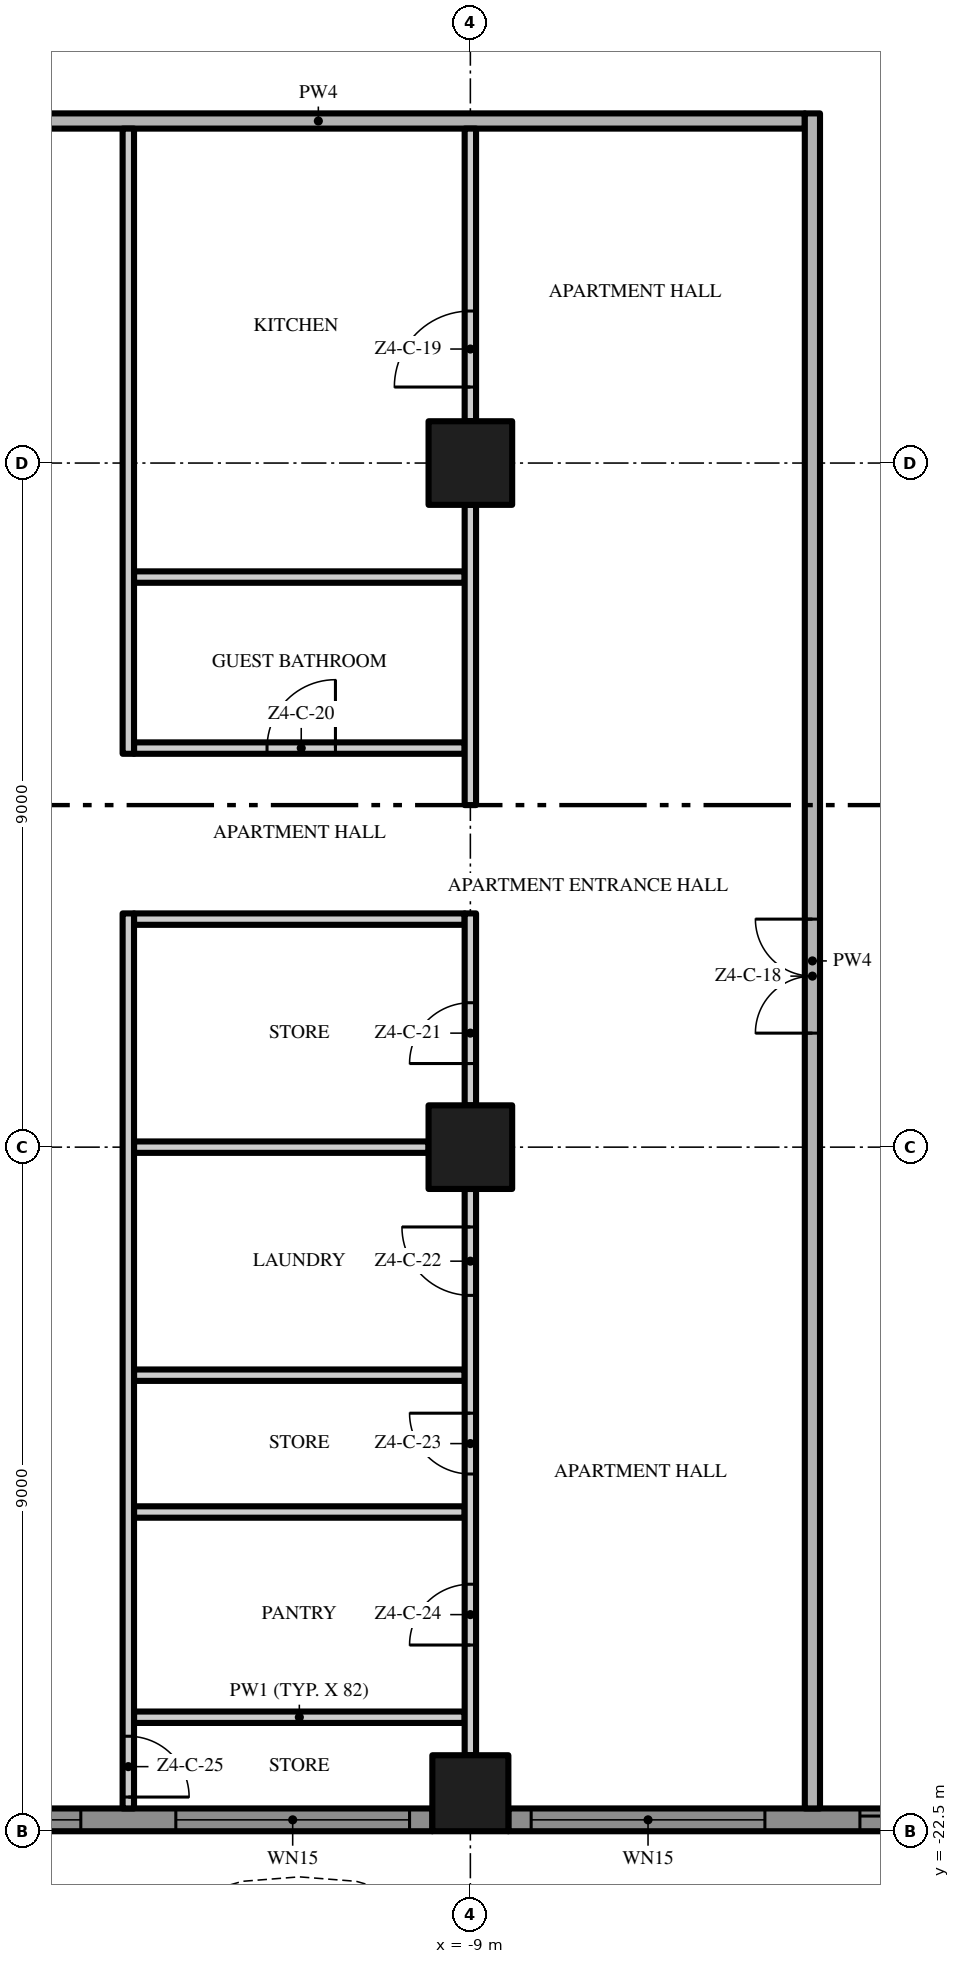
"""IFC4 building model, lengths in metres.
Left out: names, types, materials, properties, quantities, classifications, styles, units other than length and angle.
Written with IfcOpenShell. Run it as: python <this file> out.ifc"""

import sys

from ifc_helpers import new_model, si_unit, direction, frame, frame_2d, origin, origin_2d, place, context, subcontext, project, spatial, polyline, rectangle, outline, extrude, element, fill, save


model = new_model("IFC4")
c1 = context("Model", 3, precision=1e-05, world=origin(), true_north=direction((0.0, 1.0)))
c2 = subcontext(c1, "Body", "Model", "MODEL_VIEW")
j1 = project(units=[si_unit("LENGTHUNIT", "METRE"), si_unit("PLANEANGLEUNIT", "RADIAN")], contexts=[c1])
p1 = place(None, origin())
s1 = spatial("IfcSite", under=j1, at=p1, CompositionType="ELEMENT")
p2 = place(p1, origin())
s2 = spatial("IfcBuilding", under=s1, at=p2, CompositionType="ELEMENT")
p3 = place(p2, frame((0.0, 0.0, 211.0)))
s3 = spatial("IfcBuildingStorey", under=s2, at=p3, CompositionType="ELEMENT", Elevation=211.0)
p4 = place(p3, frame((-9.0, -13.5, 0.0), z_axis=(0.0, 0.0, 1.0), x_axis=(1.0, 0.0, 0.0)))
e1 = element("IfcColumn", 1, at=p4, inside=s3, PredefinedType="COLUMN", context=c2, shape_type="SweptSolid", body=[
    extrude(rectangle(XDim=1.1, YDim=1.1, at=origin_2d()), origin(), (0.0, 0.0, 1.0), 3.5),
])
p5 = place(p3, frame((-9.0, -22.0, 0.0), z_axis=(0.0, 0.0, 1.0), x_axis=(1.0, 0.0, 0.0)))
e2 = element("IfcColumn", 2, at=p5, inside=s3, PredefinedType="COLUMN", context=c2, shape_type="SweptSolid", body=[
    extrude(rectangle(XDim=1.0, YDim=1.0, at=origin_2d()), origin(), (0.0, 0.0, 1.0), 3.5),
])
p6 = place(p3, frame((-9.0, -4.5, 0.0), z_axis=(0.0, 0.0, 1.0), x_axis=(1.0, 0.0, 0.0)))
e3 = element("IfcColumn", 3, at=p6, inside=s3, PredefinedType="COLUMN", context=c2, shape_type="SweptSolid", body=[
    extrude(rectangle(XDim=1.1, YDim=1.1, at=origin_2d()), origin(), (0.0, 0.0, 1.0), 3.5),
])
p7 = place(p3, frame((-9.5, -22.35, 0.0), z_axis=(0.0, 0.0, 1.0), x_axis=(-1.0, 0.0, 0.0)))
e4 = element("IfcWall", 4, at=p7, inside=s3, PredefinedType="SOLIDWALL", context=c2, shape_type="SweptSolid", body=[
    extrude(rectangle(XDim=8.0, YDim=0.3, at=frame_2d((4.0, 0.0))), origin(), (0.0, 0.0, 1.0), 3.5),
])
p8 = place(p7, frame((4.625, 0.0, 0.45)))
e5 = element("IfcOpeningElement", 5, at=p8, cuts=e4, PredefinedType="OPENING", context=c2, shape_type="SweptSolid", body=[
    extrude(rectangle(XDim=3.075, YDim=2.65, at=frame_2d((1.538, 1.325))), frame((0.0, 0.16, 0.0), z_axis=(0.0, -1.0, 0.0), x_axis=(1.0, 0.0, 0.0)), (0.0, 0.0, 1.0), 0.32),
])
p9 = place(p7, frame((0.3, 0.0, 0.45)))
e6 = element("IfcOpeningElement", 6, at=p9, cuts=e4, PredefinedType="OPENING", context=c2, shape_type="SweptSolid", body=[
    extrude(rectangle(XDim=3.075, YDim=2.65, at=frame_2d((1.538, 1.325))), frame((0.0, 0.16, 0.0), z_axis=(0.0, -1.0, 0.0), x_axis=(1.0, 0.0, 0.0)), (0.0, 0.0, 1.0), 0.32),
])
p10 = place(p3, frame((-0.5, -22.35, 0.0), z_axis=(0.0, 0.0, 1.0), x_axis=(-1.0, 0.0, 0.0)))
e7 = element("IfcWall", 7, at=p10, inside=s3, PredefinedType="SOLIDWALL", context=c2, shape_type="SweptSolid", body=[
    extrude(rectangle(XDim=8.0, YDim=0.3, at=frame_2d((4.0, 0.0))), origin(), (0.0, 0.0, 1.0), 3.5),
])
p11 = place(p10, frame((4.625, 0.0, 0.45)))
e8 = element("IfcOpeningElement", 8, at=p11, cuts=e7, PredefinedType="OPENING", context=c2, shape_type="SweptSolid", body=[
    extrude(rectangle(XDim=3.075, YDim=2.65, at=frame_2d((1.538, 1.325))), frame((0.0, 0.16, 0.0), z_axis=(0.0, -1.0, 0.0), x_axis=(1.0, 0.0, 0.0)), (0.0, 0.0, 1.0), 0.32),
])
p12 = place(p10, frame((0.3, 0.0, 0.0)))
e9 = element("IfcOpeningElement", 9, at=p12, cuts=e7, PredefinedType="OPENING", context=c2, shape_type="SweptSolid", body=[
    extrude(rectangle(XDim=3.075, YDim=2.4, at=frame_2d((1.538, 1.2))), frame((0.0, 0.16, 0.0), z_axis=(0.0, -1.0, 0.0), x_axis=(1.0, 0.0, 0.0)), (0.0, 0.0, 1.0), 0.32),
])
p13 = place(p3, origin())
e10 = element("IfcWall", 10, at=p13, inside=s3, PredefinedType="USERDEFINED", context=c2, shape_type="SweptSolid", body=[
    extrude(outline(polyline([(-22.5, -24.3), (-21.0, -25.005), (-19.5, -25.441), (-18.75, -25.5), (-18.0, -25.441), (-16.5, -25.005), (-15.0, -24.3), (-13.5, -23.595), (-12.0, -23.159), (-11.25, -23.1), (-10.5, -23.159), (-9.0, -23.595), (-7.5, -24.3), (-6.0, -25.005), (-4.5, -25.441), (-3.75, -25.5), (-3.0, -25.441), (-1.5, -25.005), (0.0, -24.3), (1.5, -23.595), (3.0, -23.159), (3.75, -23.1), (4.5, -23.159), (6.0, -23.595), (7.5, -24.3), (9.0, -25.005), (10.5, -25.441), (11.25, -25.5), (12.0, -25.441), (13.5, -25.005), (15.0, -24.3), (16.5, -23.595), (18.0, -23.159), (18.75, -23.1), (19.5, -23.159), (21.0, -23.595), (22.5, -24.3), (22.606, -24.074), (21.089, -23.36), (19.545, -22.911), (18.75, -22.849), (17.955, -22.911), (16.411, -23.36), (14.894, -24.074), (13.411, -24.771), (11.955, -25.194), (11.25, -25.249), (10.545, -25.194), (9.089, -24.771), (7.606, -24.074), (6.089, -23.36), (4.545, -22.911), (3.75, -22.849), (2.955, -22.911), (1.411, -23.36), (-0.106, -24.074), (-1.589, -24.771), (-3.045, -25.194), (-3.75, -25.249), (-4.455, -25.194), (-5.911, -24.771), (-7.394, -24.074), (-8.911, -23.36), (-10.455, -22.911), (-11.25, -22.849), (-12.045, -22.911), (-13.589, -23.36), (-15.106, -24.074), (-16.589, -24.771), (-18.045, -25.194), (-18.75, -25.249), (-19.455, -25.194), (-20.911, -24.771), (-22.394, -24.074), (-22.5, -24.3)])), origin(), (0.0, 0.0, 1.0), 0.9),
])
for number, where, z_axis, x_axis in (
    (11, (-13.425, -21.0, 0.0), (0.0, 0.0, 1.0), (1.0, 0.0, 0.0)),
    (12, (-13.425, -18.3, 0.0), (0.0, 0.0, 1.0), (1.0, 0.0, 0.0)),
    (13, (-13.425, -16.5, 0.0), (0.0, 0.0, 1.0), (1.0, 0.0, 0.0)),
):
    element("IfcWall", number, at=place(p3, frame(where, z_axis=z_axis, x_axis=x_axis)), inside=s3, PredefinedType="PARTITIONING", context=c2, shape_type="SweptSolid", body=[
        extrude(rectangle(XDim=4.35, YDim=0.15, at=frame_2d((2.175, 0.0))), origin(), (0.0, 0.0, 1.0), 3.5),
    ])
p14 = place(p3, frame((-13.425, -13.5, 0.0), z_axis=(0.0, 0.0, 1.0), x_axis=(1.0, 0.0, 0.0)))
e14 = element("IfcWall", 14, at=p14, inside=s3, PredefinedType="PARTITIONING", context=c2, shape_type="SweptSolid", body=[
    extrude(rectangle(XDim=3.875, YDim=0.15, at=frame_2d((1.938, 0.0))), origin(), (0.0, 0.0, 1.0), 3.5),
])
p15 = place(p3, frame((-13.425, -10.5, 0.0), z_axis=(0.0, 0.0, 1.0), x_axis=(1.0, 0.0, 0.0)))
e15 = element("IfcWall", 15, at=p15, inside=s3, PredefinedType="PARTITIONING", context=c2, shape_type="SweptSolid", body=[
    extrude(rectangle(XDim=4.35, YDim=0.15, at=frame_2d((2.175, 0.0))), origin(), (0.0, 0.0, 1.0), 3.5),
])
p16 = place(p3, frame((-13.425, -8.25, 0.0), z_axis=(0.0, 0.0, 1.0), x_axis=(1.0, 0.0, 0.0)))
e16 = element("IfcWall", 16, at=p16, inside=s3, PredefinedType="PARTITIONING", context=c2, shape_type="SweptSolid", body=[
    extrude(rectangle(XDim=4.35, YDim=0.15, at=frame_2d((2.175, 0.0))), origin(), (0.0, 0.0, 1.0), 3.5),
])
p17 = place(p16, frame((1.75, 0.0, 0.0)))
e17 = element("IfcOpeningElement", 17, at=p17, cuts=e16, PredefinedType="OPENING", context=c2, shape_type="SweptSolid", body=[
    extrude(rectangle(XDim=0.9, YDim=2.1, at=frame_2d((0.45, 1.05))), frame((0.0, 0.085, 0.0), z_axis=(0.0, -1.0, 0.0), x_axis=(1.0, 0.0, 0.0)), (0.0, 0.0, 1.0), 0.17),
])
p18 = place(p3, frame((-13.425, -6.0, 0.0), z_axis=(0.0, 0.0, 1.0), x_axis=(1.0, 0.0, 0.0)))
e18 = element("IfcWall", 18, at=p18, inside=s3, PredefinedType="PARTITIONING", context=c2, shape_type="SweptSolid", body=[
    extrude(rectangle(XDim=4.35, YDim=0.15, at=frame_2d((2.175, 0.0))), origin(), (0.0, 0.0, 1.0), 3.5),
])
p19 = place(p3, frame((-17.4, 0.0, 0.0), z_axis=(0.0, 0.0, 1.0), x_axis=(1.0, 0.0, 0.0)))
e19 = element("IfcWall", 19, at=p19, inside=s3, PredefinedType="PARTITIONING", context=c2, shape_type="SweptSolid", body=[
    extrude(rectangle(XDim=12.8, YDim=0.2, at=frame_2d((6.4, 0.0))), origin(), (0.0, 0.0, 1.0), 3.5),
])
p20 = place(p3, frame((-13.5, -10.425, 0.0), z_axis=(0.0, 0.0, 1.0), x_axis=(0.0, -1.0, 0.0)))
e20 = element("IfcWall", 20, at=p20, inside=s3, PredefinedType="PARTITIONING", context=c2, shape_type="SweptSolid", body=[
    extrude(rectangle(XDim=11.775, YDim=0.15, at=frame_2d((5.888, 0.0))), origin(), (0.0, 0.0, 1.0), 3.5),
])
p21 = place(p20, frame((10.825, 0.0, 0.0)))
e21 = element("IfcOpeningElement", 21, at=p21, cuts=e20, PredefinedType="OPENING", context=c2, shape_type="SweptSolid", body=[
    extrude(rectangle(XDim=0.8, YDim=2.0, at=frame_2d((0.4, 1.0))), frame((0.0, 0.085, 0.0), z_axis=(0.0, -1.0, 0.0), x_axis=(1.0, 0.0, 0.0)), (0.0, 0.0, 1.0), 0.17),
])
p22 = place(p3, frame((-13.5, -8.325, 0.0), z_axis=(0.0, 0.0, 1.0), x_axis=(0.0, 1.0, 0.0)))
e22 = element("IfcWall", 22, at=p22, inside=s3, PredefinedType="PARTITIONING", context=c2, shape_type="SweptSolid", body=[
    extrude(rectangle(XDim=8.225, YDim=0.15, at=frame_2d((4.112, 0.0))), origin(), (0.0, 0.0, 1.0), 3.5),
])
p23 = place(p3, frame((-9.0, -21.5, 0.0), z_axis=(0.0, 0.0, 1.0), x_axis=(0.0, 1.0, 0.0)))
e23 = element("IfcWall", 23, at=p23, inside=s3, PredefinedType="PARTITIONING", context=c2, shape_type="SweptSolid", body=[
    extrude(rectangle(XDim=7.45, YDim=0.15, at=frame_2d((3.725, 0.0))), origin(), (0.0, 0.0, 1.0), 3.5),
])
p24 = place(p23, frame((6.05, 0.0, 0.0)))
e24 = element("IfcOpeningElement", 24, at=p24, cuts=e23, PredefinedType="OPENING", context=c2, shape_type="SweptSolid", body=[
    extrude(rectangle(XDim=0.9, YDim=2.1, at=frame_2d((0.45, 1.05))), frame((0.0, 0.085, 0.0), z_axis=(0.0, -1.0, 0.0), x_axis=(1.0, 0.0, 0.0)), (0.0, 0.0, 1.0), 0.17),
])
p25 = place(p23, frame((3.7, 0.0, 0.0)))
e25 = element("IfcOpeningElement", 25, at=p25, cuts=e23, PredefinedType="OPENING", context=c2, shape_type="SweptSolid", body=[
    extrude(rectangle(XDim=0.8, YDim=2.0, at=frame_2d((0.4, 1.0))), frame((0.0, 0.085, 0.0), z_axis=(0.0, -1.0, 0.0), x_axis=(1.0, 0.0, 0.0)), (0.0, 0.0, 1.0), 0.17),
])
p26 = place(p23, frame((1.45, 0.0, 0.0)))
e26 = element("IfcOpeningElement", 26, at=p26, cuts=e23, PredefinedType="OPENING", context=c2, shape_type="SweptSolid", body=[
    extrude(rectangle(XDim=0.8, YDim=2.0, at=frame_2d((0.4, 1.0))), frame((0.0, 0.085, 0.0), z_axis=(0.0, -1.0, 0.0), x_axis=(1.0, 0.0, 0.0)), (0.0, 0.0, 1.0), 0.17),
])
p27 = place(p3, frame((-9.0, -12.95, 0.0), z_axis=(0.0, 0.0, 1.0), x_axis=(0.0, 1.0, 0.0)))
e27 = element("IfcWall", 27, at=p27, inside=s3, PredefinedType="PARTITIONING", context=c2, shape_type="SweptSolid", body=[
    extrude(rectangle(XDim=2.525, YDim=0.15, at=frame_2d((1.262, 0.0))), origin(), (0.0, 0.0, 1.0), 3.5),
])
p28 = place(p27, frame((0.55, 0.0, 0.0)))
e28 = element("IfcOpeningElement", 28, at=p28, cuts=e27, PredefinedType="OPENING", context=c2, shape_type="SweptSolid", body=[
    extrude(rectangle(XDim=0.8, YDim=2.0, at=frame_2d((0.4, 1.0))), frame((0.0, 0.085, 0.0), z_axis=(0.0, -1.0, 0.0), x_axis=(1.0, 0.0, 0.0)), (0.0, 0.0, 1.0), 0.17),
])
p29 = place(p3, frame((-9.0, -9.0, 0.0), z_axis=(0.0, 0.0, 1.0), x_axis=(0.0, 1.0, 0.0)))
e29 = element("IfcWall", 29, at=p29, inside=s3, PredefinedType="PARTITIONING", context=c2, shape_type="SweptSolid", body=[
    extrude(rectangle(XDim=3.95, YDim=0.15, at=frame_2d((1.975, 0.0))), origin(), (0.0, 0.0, 1.0), 3.5),
])
p30 = place(p3, frame((-9.0, -3.95, 0.0), z_axis=(0.0, 0.0, 1.0), x_axis=(0.0, 1.0, 0.0)))
e30 = element("IfcWall", 30, at=p30, inside=s3, PredefinedType="PARTITIONING", context=c2, shape_type="SweptSolid", body=[
    extrude(rectangle(XDim=3.85, YDim=0.15, at=frame_2d((1.925, 0.0))), origin(), (0.0, 0.0, 1.0), 3.5),
])
p31 = place(p30, frame((0.45, 0.0, 0.0)))
e31 = element("IfcOpeningElement", 31, at=p31, cuts=e30, PredefinedType="OPENING", context=c2, shape_type="SweptSolid", body=[
    extrude(rectangle(XDim=1.0, YDim=2.4, at=frame_2d((0.5, 1.2))), frame((0.0, 0.085, 0.0), z_axis=(0.0, -1.0, 0.0), x_axis=(1.0, 0.0, 0.0)), (0.0, 0.0, 1.0), 0.17),
])
p32 = place(p3, frame((-4.5, -22.2, 0.0), z_axis=(0.0, 0.0, 1.0), x_axis=(0.0, 1.0, 0.0)))
e32 = element("IfcWall", 32, at=p32, inside=s3, PredefinedType="PARTITIONING", context=c2, shape_type="SweptSolid", body=[
    extrude(rectangle(XDim=22.3, YDim=0.2, at=frame_2d((11.15, 0.0))), origin(), (0.0, 0.0, 1.0), 3.5),
])
p33 = place(p32, frame((10.2, 0.0, 0.0)))
e33 = element("IfcOpeningElement", 33, at=p33, cuts=e32, PredefinedType="OPENING", context=c2, shape_type="SweptSolid", body=[
    extrude(rectangle(XDim=1.5, YDim=2.4, at=frame_2d((0.75, 1.2))), frame((0.0, 0.11, 0.0), z_axis=(0.0, -1.0, 0.0), x_axis=(1.0, 0.0, 0.0)), (0.0, 0.0, 1.0), 0.22),
])
p34 = place(p8, origin())
e34 = element("IfcWindow", 34, at=p34, inside=s3, PartitioningType="SINGLE_PANEL", PredefinedType="WINDOW", context=c2, shape_type="SweptSolid", body=[
    extrude(rectangle(XDim=3.075, YDim=2.65, at=frame_2d((1.538, 1.325))), frame((0.0, 0.03, 0.0), z_axis=(0.0, -1.0, 0.0), x_axis=(1.0, 0.0, 0.0)), (0.0, 0.0, 1.0), 0.06),
])
fill(e5, e34)
p35 = place(p9, origin())
e35 = element("IfcWindow", 35, at=p35, inside=s3, PartitioningType="SINGLE_PANEL", PredefinedType="WINDOW", context=c2, shape_type="SweptSolid", body=[
    extrude(rectangle(XDim=3.075, YDim=2.65, at=frame_2d((1.538, 1.325))), frame((0.0, 0.03, 0.0), z_axis=(0.0, -1.0, 0.0), x_axis=(1.0, 0.0, 0.0)), (0.0, 0.0, 1.0), 0.06),
])
fill(e6, e35)
p36 = place(p11, origin())
e36 = element("IfcWindow", 36, at=p36, inside=s3, PartitioningType="SINGLE_PANEL", PredefinedType="WINDOW", context=c2, shape_type="SweptSolid", body=[
    extrude(rectangle(XDim=3.075, YDim=2.65, at=frame_2d((1.538, 1.325))), frame((0.0, 0.03, 0.0), z_axis=(0.0, -1.0, 0.0), x_axis=(1.0, 0.0, 0.0)), (0.0, 0.0, 1.0), 0.06),
])
fill(e8, e36)
p37 = place(p12, origin())
e37 = element("IfcDoor", 37, at=p37, inside=s3, OperationType="SINGLE_SWING_LEFT", PredefinedType="DOOR", context=c2, shape_type="SweptSolid", body=[
    extrude(rectangle(XDim=3.075, YDim=2.4, at=frame_2d((1.538, 1.2))), frame((0.0, 0.025, 0.0), z_axis=(0.0, -1.0, 0.0), x_axis=(1.0, 0.0, 0.0)), (0.0, 0.0, 1.0), 0.05),
])
fill(e9, e37)
p38 = place(p33, origin())
e38 = element("IfcDoor", 38, at=p38, inside=s3, OperationType="DOUBLE_DOOR_SINGLE_SWING", PredefinedType="DOOR", context=c2, shape_type="SweptSolid", body=[
    extrude(rectangle(XDim=1.5, YDim=2.4, at=frame_2d((0.75, 1.2))), frame((0.0, 0.025, 0.0), z_axis=(0.0, -1.0, 0.0), x_axis=(1.0, 0.0, 0.0)), (0.0, 0.0, 1.0), 0.05),
])
fill(e33, e38)
p39 = place(p31, origin())
e39 = element("IfcDoor", 39, at=p39, inside=s3, OperationType="SINGLE_SWING_LEFT", PredefinedType="DOOR", context=c2, shape_type="SweptSolid", body=[
    extrude(rectangle(XDim=1.0, YDim=2.4, at=frame_2d((0.5, 1.2))), frame((0.0, 0.025, 0.0), z_axis=(0.0, -1.0, 0.0), x_axis=(1.0, 0.0, 0.0)), (0.0, 0.0, 1.0), 0.05),
])
fill(e31, e39)
p40 = place(p17, origin())
e40 = element("IfcDoor", 40, at=p40, inside=s3, OperationType="SINGLE_SWING_RIGHT", PredefinedType="DOOR", context=c2, shape_type="SweptSolid", body=[
    extrude(rectangle(XDim=0.9, YDim=2.1, at=frame_2d((0.45, 1.05))), frame((0.0, 0.025, 0.0), z_axis=(0.0, -1.0, 0.0), x_axis=(1.0, 0.0, 0.0)), (0.0, 0.0, 1.0), 0.05),
])
fill(e17, e40)
p41 = place(p28, origin())
e41 = element("IfcDoor", 41, at=p41, inside=s3, OperationType="SINGLE_SWING_LEFT", PredefinedType="DOOR", context=c2, shape_type="SweptSolid", body=[
    extrude(rectangle(XDim=0.8, YDim=2.0, at=frame_2d((0.4, 1.0))), frame((0.0, 0.025, 0.0), z_axis=(0.0, -1.0, 0.0), x_axis=(1.0, 0.0, 0.0)), (0.0, 0.0, 1.0), 0.05),
])
fill(e28, e41)
p42 = place(p24, origin())
e42 = element("IfcDoor", 42, at=p42, inside=s3, OperationType="SINGLE_SWING_RIGHT", PredefinedType="DOOR", context=c2, shape_type="SweptSolid", body=[
    extrude(rectangle(XDim=0.9, YDim=2.1, at=frame_2d((0.45, 1.05))), frame((0.0, 0.025, 0.0), z_axis=(0.0, -1.0, 0.0), x_axis=(1.0, 0.0, 0.0)), (0.0, 0.0, 1.0), 0.05),
])
fill(e24, e42)
p43 = place(p25, origin())
e43 = element("IfcDoor", 43, at=p43, inside=s3, OperationType="SINGLE_SWING_RIGHT", PredefinedType="DOOR", context=c2, shape_type="SweptSolid", body=[
    extrude(rectangle(XDim=0.8, YDim=2.0, at=frame_2d((0.4, 1.0))), frame((0.0, 0.025, 0.0), z_axis=(0.0, -1.0, 0.0), x_axis=(1.0, 0.0, 0.0)), (0.0, 0.0, 1.0), 0.05),
])
fill(e25, e43)
p44 = place(p26, origin())
e44 = element("IfcDoor", 44, at=p44, inside=s3, OperationType="SINGLE_SWING_LEFT", PredefinedType="DOOR", context=c2, shape_type="SweptSolid", body=[
    extrude(rectangle(XDim=0.8, YDim=2.0, at=frame_2d((0.4, 1.0))), frame((0.0, 0.025, 0.0), z_axis=(0.0, -1.0, 0.0), x_axis=(1.0, 0.0, 0.0)), (0.0, 0.0, 1.0), 0.05),
])
fill(e26, e44)
p45 = place(p21, origin())
e45 = element("IfcDoor", 45, at=p45, inside=s3, OperationType="SINGLE_SWING_RIGHT", PredefinedType="DOOR", context=c2, shape_type="SweptSolid", body=[
    extrude(rectangle(XDim=0.8, YDim=2.0, at=frame_2d((0.4, 1.0))), frame((0.0, 0.025, 0.0), z_axis=(0.0, -1.0, 0.0), x_axis=(1.0, 0.0, 0.0)), (0.0, 0.0, 1.0), 0.05),
])
fill(e21, e45)
save(model, sys.argv[1])
